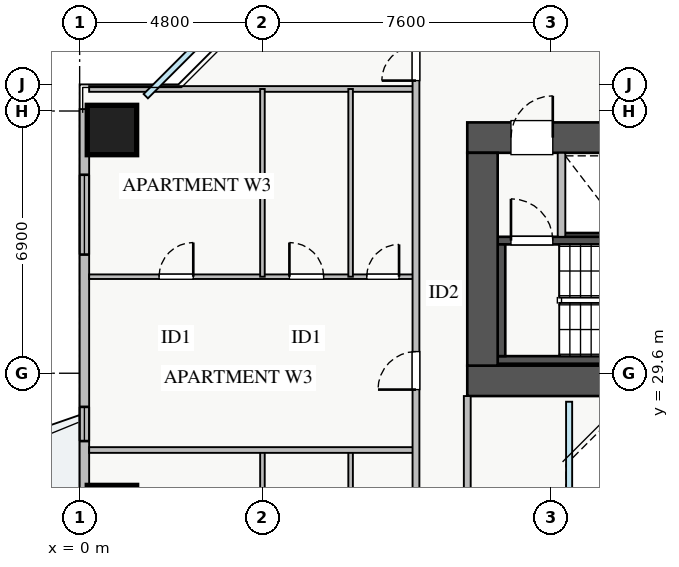
"""IFC4 building model, lengths in metres.
Left out: names, types, materials, properties, quantities, classifications, styles, units other than length and angle.
Written with IfcOpenShell. Run it as: python <this file> out.ifc"""

import sys

from ifc_helpers import new_model, si_unit, direction, frame, frame_2d, origin, origin_2d, place, context, subcontext, project, spatial, rectangle, extrude, source, transform, mapped, element, fill, save


model = new_model("IFC4")
c1 = context("Model", 3, precision=1e-05, world=origin(), true_north=direction((0.0, 1.0)))
c2 = subcontext(c1, "Body", "Model", "MODEL_VIEW")
j1 = project(units=[si_unit("LENGTHUNIT", "METRE"), si_unit("PLANEANGLEUNIT", "RADIAN")], contexts=[c1])
p1 = place(None, origin())
s1 = spatial("IfcSite", under=j1, at=p1, CompositionType="ELEMENT")
p2 = place(p1, origin())
s2 = spatial("IfcBuilding", under=s1, at=p2, CompositionType="ELEMENT")
p3 = place(p2, frame((0.0, 0.0, 79.5)))
s3 = spatial("IfcBuildingStorey", under=s2, at=p3, CompositionType="ELEMENT", Elevation=79.5)
p4 = place(p3, frame((12.68, 33.2, 0.0), z_axis=(0.0, 0.0, 1.0), x_axis=(1.0, 0.0, 0.0)))
e1 = element("IfcWall", 1, at=p4, inside=s3, PredefinedType="SHEAR", context=c2, shape_type="SweptSolid", body=[
    extrude(rectangle(XDim=1.94, YDim=0.18, at=frame_2d((0.97, 0.0))), origin(), (0.0, 0.0, 1.0), 3.07),
])
p5 = place(p3, frame((11.0, 29.95, 0.0), z_axis=(0.0, 0.0, 1.0), x_axis=(1.0, 0.0, 0.0)))
e2 = element("IfcWall", 2, at=p5, inside=s3, PredefinedType="SHEAR", context=c2, shape_type="SweptSolid", body=[
    extrude(rectangle(XDim=7.15, YDim=0.2, at=frame_2d((3.575, 0.0))), origin(), (0.0, 0.0, 1.0), 3.25),
])
p6 = place(p3, frame((11.0, 33.09, 0.0), z_axis=(0.0, 0.0, 1.0), x_axis=(1.0, 0.0, 0.0)))
e3 = element("IfcWall", 3, at=p6, inside=s3, PredefinedType="SHEAR", context=c2, shape_type="SweptSolid", body=[
    extrude(rectangle(XDim=7.15, YDim=0.2, at=frame_2d((3.575, 0.0))), origin(), (0.0, 0.0, 1.0), 3.25),
])
p7 = place(p6, frame((0.35, 0.0, 0.0)))
e4 = element("IfcOpeningElement", 4, at=p7, cuts=e3, PredefinedType="OPENING", context=c2, shape_type="SweptSolid", body=[
    extrude(rectangle(XDim=1.1, YDim=2.05, at=frame_2d((0.55, 1.025))), frame((0.0, 0.11, 0.0), z_axis=(0.0, -1.0, 0.0), x_axis=(1.0, 0.0, 0.0)), (0.0, 0.0, 1.0), 0.22),
])
p8 = place(p3, frame((11.1, 30.05, 0.0), z_axis=(0.0, 0.0, 1.0), x_axis=(0.0, 1.0, 0.0)))
e5 = element("IfcWall", 5, at=p8, inside=s3, PredefinedType="SHEAR", context=c2, shape_type="SweptSolid", body=[
    extrude(rectangle(XDim=2.94, YDim=0.2, at=frame_2d((1.47, 0.0))), origin(), (0.0, 0.0, 1.0), 3.25),
])
p9 = place(p3, frame((10.2, 29.4, 0.0), z_axis=(0.0, 0.0, 1.0), x_axis=(1.0, 0.0, 0.0)))
e6 = element("IfcWall", 6, at=p9, inside=s3, PredefinedType="SHEAR", context=c2, shape_type="SweptSolid", body=[
    extrude(rectangle(XDim=17.6, YDim=0.8, at=frame_2d((8.8, 0.0))), origin(), (0.0, 0.0, 1.0), 3.25),
])
p10 = place(p3, frame((10.2, 35.8, 0.0), z_axis=(0.0, 0.0, 1.0), x_axis=(1.0, 0.0, 0.0)))
e7 = element("IfcWall", 7, at=p10, inside=s3, PredefinedType="SHEAR", context=c2, shape_type="SweptSolid", body=[
    extrude(rectangle(XDim=17.6, YDim=0.8, at=frame_2d((8.8, 0.0))), origin(), (0.0, 0.0, 1.0), 3.25),
])
p11 = place(p10, frame((1.15, 0.0, 0.0)))
e8 = element("IfcOpeningElement", 8, at=p11, cuts=e7, PredefinedType="OPENING", context=c2, shape_type="SweptSolid", body=[
    extrude(rectangle(XDim=1.1, YDim=2.05, at=frame_2d((0.55, 1.025))), frame((0.0, 0.41, 0.0), z_axis=(0.0, -1.0, 0.0), x_axis=(1.0, 0.0, 0.0)), (0.0, 0.0, 1.0), 0.82),
])
p12 = place(p10, frame((8.3, 0.0, 0.0)))
e9 = element("IfcOpeningElement", 9, at=p12, cuts=e7, PredefinedType="OPENING", context=c2, shape_type="SweptSolid", body=[
    extrude(rectangle(XDim=1.1, YDim=2.05, at=frame_2d((0.55, 1.025))), frame((0.0, 0.41, 0.0), z_axis=(0.0, -1.0, 0.0), x_axis=(1.0, 0.0, 0.0)), (0.0, 0.0, 1.0), 0.82),
])
p13 = place(p10, frame((10.05, 0.0, 0.0)))
e10 = element("IfcOpeningElement", 10, at=p13, cuts=e7, PredefinedType="OPENING", context=c2, shape_type="SweptSolid", body=[
    extrude(rectangle(XDim=1.1, YDim=2.05, at=frame_2d((0.55, 1.025))), frame((0.0, 0.41, 0.0), z_axis=(0.0, -1.0, 0.0), x_axis=(1.0, 0.0, 0.0)), (0.0, 0.0, 1.0), 0.82),
])
p14 = place(p10, frame((14.74, 0.0, 0.0)))
e11 = element("IfcOpeningElement", 11, at=p14, cuts=e7, PredefinedType="OPENING", context=c2, shape_type="SweptSolid", body=[
    extrude(rectangle(XDim=1.0, YDim=2.05, at=frame_2d((0.5, 1.025))), frame((0.0, 0.41, 0.0), z_axis=(0.0, -1.0, 0.0), x_axis=(1.0, 0.0, 0.0)), (0.0, 0.0, 1.0), 0.82),
])
p15 = place(p10, frame((11.835, 0.0, 0.0)))
e12 = element("IfcOpeningElement", 12, at=p15, cuts=e7, PredefinedType="OPENING", context=c2, shape_type="SweptSolid", body=[
    extrude(rectangle(XDim=1.0, YDim=2.05, at=frame_2d((0.5, 1.025))), frame((0.0, 0.41, 0.0), z_axis=(0.0, -1.0, 0.0), x_axis=(1.0, 0.0, 0.0)), (0.0, 0.0, 1.0), 0.82),
])
p16 = place(p10, frame((13.37, 0.0, 0.0)))
e13 = element("IfcOpeningElement", 13, at=p16, cuts=e7, PredefinedType="OPENING", context=c2, shape_type="SweptSolid", body=[
    extrude(rectangle(XDim=1.0, YDim=2.05, at=frame_2d((0.5, 1.025))), frame((0.0, 0.41, 0.0), z_axis=(0.0, -1.0, 0.0), x_axis=(1.0, 0.0, 0.0)), (0.0, 0.0, 1.0), 0.82),
])
p17 = place(p3, frame((10.6, 29.8, 0.0), z_axis=(0.0, 0.0, 1.0), x_axis=(0.0, 1.0, 0.0)))
e14 = element("IfcWall", 14, at=p17, inside=s3, PredefinedType="SHEAR", context=c2, shape_type="SweptSolid", body=[
    extrude(rectangle(XDim=5.6, YDim=0.8, at=frame_2d((2.8, 0.0))), origin(), (0.0, 0.0, 1.0), 3.25),
])
m1 = source(origin(), c2, "Body", "SweptSolid", [
    extrude(rectangle(XDim=1.3, YDim=1.3, at=origin_2d()), origin(), (0.0, 0.0, 1.0), 3.25),
])
for number, where, z_axis, x_axis in (
    (15, (0.85, 36.0, 0.0), (0.0, 0.0, 1.0), (1.0, 0.0, 0.0)),
    (16, (0.85, 26.0, 0.0), (0.0, 0.0, 1.0), (1.0, 0.0, 0.0)),
):
    element("IfcColumn", number, at=place(p3, frame(where, z_axis=z_axis, x_axis=x_axis)), inside=s3, PredefinedType="COLUMN", context=c2, shape_type="MappedRepresentation", body=[
        mapped(m1, transform((0.0, 0.0, 0.0), x_axis=(1.0, 0.0, 0.0), y_axis=(0.0, 1.0, 0.0), z_axis=(0.0, 0.0, 1.0), scale=1.0)),
    ])
p18 = place(p3, frame((0.125, 9.45, 0.0), z_axis=(0.0, 0.0, 1.0), x_axis=(0.0, 1.0, 0.0)))
e17 = element("IfcWall", 17, at=p18, inside=s3, PredefinedType="STANDARD", context=c2, shape_type="SweptSolid", body=[
    extrude(rectangle(XDim=27.1, YDim=0.25, at=frame_2d((13.55, 0.0))), origin(), (0.0, 0.0, 1.0), 2.61),
])
p19 = place(p18, frame((14.4, 0.0, 0.0)))
e18 = element("IfcOpeningElement", 18, at=p19, cuts=e17, PredefinedType="OPENING", context=c2, shape_type="SweptSolid", body=[
    extrude(rectangle(XDim=1.2, YDim=2.1, at=frame_2d((0.6, 1.05))), frame((0.0, 0.135, 0.0), z_axis=(0.0, -1.0, 0.0), x_axis=(1.0, 0.0, 0.0)), (0.0, 0.0, 1.0), 0.27),
])
p20 = place(p18, frame((2.188, 0.0, 0.9)))
e19 = element("IfcOpeningElement", 19, at=p20, cuts=e17, PredefinedType="OPENING", context=c2, shape_type="SweptSolid", body=[
    extrude(rectangle(XDim=2.4, YDim=1.48, at=frame_2d((1.2, 0.74))), frame((0.0, 0.135, 0.0), z_axis=(0.0, -1.0, 0.0), x_axis=(1.0, 0.0, 0.0)), (0.0, 0.0, 1.0), 0.27),
])
p21 = place(p18, frame((23.272, 0.0, 0.9)))
e20 = element("IfcOpeningElement", 20, at=p21, cuts=e17, PredefinedType="OPENING", context=c2, shape_type="SweptSolid", body=[
    extrude(rectangle(XDim=2.1, YDim=1.5, at=frame_2d((1.05, 0.75))), frame((0.0, 0.135, 0.0), z_axis=(0.0, -1.0, 0.0), x_axis=(1.0, 0.0, 0.0)), (0.0, 0.0, 1.0), 0.27),
])
p22 = place(p18, frame((11.365, 0.0, 0.9)))
e21 = element("IfcOpeningElement", 21, at=p22, cuts=e17, PredefinedType="OPENING", context=c2, shape_type="SweptSolid", body=[
    extrude(rectangle(XDim=0.9, YDim=1.2, at=frame_2d((0.45, 0.6))), frame((0.0, 0.135, 0.0), z_axis=(0.0, -1.0, 0.0), x_axis=(1.0, 0.0, 0.0)), (0.0, 0.0, 1.0), 0.27),
])
p23 = place(p18, frame((18.365, 0.0, 0.9)))
e22 = element("IfcOpeningElement", 22, at=p23, cuts=e17, PredefinedType="OPENING", context=c2, shape_type="SweptSolid", body=[
    extrude(rectangle(XDim=0.9, YDim=1.2, at=frame_2d((0.45, 0.6))), frame((0.0, 0.135, 0.0), z_axis=(0.0, -1.0, 0.0), x_axis=(1.0, 0.0, 0.0)), (0.0, 0.0, 1.0), 0.27),
])
p24 = place(p3, frame((12.68, 33.19, 0.0), z_axis=(0.0, 0.0, 1.0), x_axis=(0.0, 1.0, 0.0)))
e23 = element("IfcWall", 23, at=p24, inside=s3, PredefinedType="PARTITIONING", context=c2, shape_type="SweptSolid", body=[
    extrude(rectangle(XDim=2.21, YDim=0.2, at=frame_2d((1.105, 0.0))), origin(), (0.0, 0.0, 1.0), 3.07),
])
p25 = place(p3, frame((0.25, 37.08, 0.0), z_axis=(0.0, 0.0, 1.0), x_axis=(1.0, 0.0, 0.0)))
e24 = element("IfcWall", 24, at=p25, inside=s3, PredefinedType="PARTITIONING", context=c2, shape_type="SweptSolid", body=[
    extrude(rectangle(XDim=8.6, YDim=0.15, at=frame_2d((4.3, 0.0))), origin(), (0.0, 0.0, 1.0), 3.07),
])
for number, where, z_axis, x_axis in (
    (25, (4.81, 22.93, 0.0), (0.0, 0.0, 1.0), (0.0, 1.0, 0.0)),
    (26, (7.13, 22.93, 0.0), (0.0, 0.0, 1.0), (0.0, 1.0, 0.0)),
):
    element("IfcWall", number, at=place(p3, frame(where, z_axis=z_axis, x_axis=x_axis)), inside=s3, PredefinedType="PLUMBINGWALL", context=c2, shape_type="SweptSolid", body=[
        extrude(rectangle(XDim=4.65, YDim=0.12, at=frame_2d((2.325, 0.0))), origin(), (0.0, 0.0, 1.0), 3.07),
    ])
p26 = place(p3, frame((0.25, 32.14, 0.0), z_axis=(0.0, 0.0, 1.0), x_axis=(1.0, 0.0, 0.0)))
e27 = element("IfcWall", 27, at=p26, inside=s3, PredefinedType="PLUMBINGWALL", context=c2, shape_type="SweptSolid", body=[
    extrude(rectangle(XDim=8.6, YDim=0.12, at=frame_2d((4.3, 0.0))), origin(), (0.0, 0.0, 1.0), 3.07),
])
p27 = place(p26, frame((1.84, 0.0, 0.0)))
e28 = element("IfcOpeningElement", 28, at=p27, cuts=e27, PredefinedType="OPENING", context=c2, shape_type="SweptSolid", body=[
    extrude(rectangle(XDim=0.9, YDim=2.05, at=frame_2d((0.45, 1.025))), frame((0.0, 0.07, 0.0), z_axis=(0.0, -1.0, 0.0), x_axis=(1.0, 0.0, 0.0)), (0.0, 0.0, 1.0), 0.14),
])
p28 = place(p26, frame((5.27, 0.0, 0.0)))
e29 = element("IfcOpeningElement", 29, at=p28, cuts=e27, PredefinedType="OPENING", context=c2, shape_type="SweptSolid", body=[
    extrude(rectangle(XDim=0.9, YDim=2.05, at=frame_2d((0.45, 1.025))), frame((0.0, 0.07, 0.0), z_axis=(0.0, -1.0, 0.0), x_axis=(1.0, 0.0, 0.0)), (0.0, 0.0, 1.0), 0.14),
])
p29 = place(p26, frame((7.305, 0.0, 0.0)))
e30 = element("IfcOpeningElement", 30, at=p29, cuts=e27, PredefinedType="OPENING", context=c2, shape_type="SweptSolid", body=[
    extrude(rectangle(XDim=0.85, YDim=2.05, at=frame_2d((0.425, 1.025))), frame((0.0, 0.07, 0.0), z_axis=(0.0, -1.0, 0.0), x_axis=(1.0, 0.0, 0.0)), (0.0, 0.0, 1.0), 0.14),
])
for number, where, z_axis, x_axis in (
    (31, (4.81, 32.14, 0.0), (0.0, 0.0, 1.0), (0.0, 1.0, 0.0)),
    (32, (7.13, 32.14, 0.0), (0.0, 0.0, 1.0), (0.0, 1.0, 0.0)),
):
    element("IfcWall", number, at=place(p3, frame(where, z_axis=z_axis, x_axis=x_axis)), inside=s3, PredefinedType="PLUMBINGWALL", context=c2, shape_type="SweptSolid", body=[
        extrude(rectangle(XDim=4.94, YDim=0.12, at=frame_2d((2.47, 0.0))), origin(), (0.0, 0.0, 1.0), 3.07),
    ])
p30 = place(p3, frame((0.25, 27.58, 0.0), z_axis=(0.0, 0.0, 1.0), x_axis=(1.0, 0.0, 0.0)))
e33 = element("IfcWall", 33, at=p30, inside=s3, PredefinedType="PARTITIONING", context=c2, shape_type="SweptSolid", body=[
    extrude(rectangle(XDim=8.6, YDim=0.15, at=frame_2d((4.3, 0.0))), origin(), (0.0, 0.0, 1.0), 3.07),
])
p31 = place(p3, frame((8.85, 7.21, 0.0), z_axis=(0.0, 0.0, 1.0), x_axis=(0.0, 1.0, 0.0)))
e34 = element("IfcWall", 34, at=p31, inside=s3, PredefinedType="PARTITIONING", context=c2, shape_type="SweptSolid", body=[
    extrude(rectangle(XDim=31.23, YDim=0.18, at=frame_2d((15.615, 0.0))), origin(), (0.0, 0.0, 1.0), 3.07),
])
p32 = place(p31, frame((30.09, 0.0, 0.0)))
e35 = element("IfcOpeningElement", 35, at=p32, cuts=e34, PredefinedType="OPENING", context=c2, shape_type="SweptSolid", body=[
    extrude(rectangle(XDim=0.9, YDim=2.05, at=frame_2d((0.45, 1.025))), frame((0.0, 0.1, 0.0), z_axis=(0.0, -1.0, 0.0), x_axis=(1.0, 0.0, 0.0)), (0.0, 0.0, 1.0), 0.2),
])
p33 = place(p31, frame((0.24, 0.0, 0.0)))
e36 = element("IfcOpeningElement", 36, at=p33, cuts=e34, PredefinedType="OPENING", context=c2, shape_type="SweptSolid", body=[
    extrude(rectangle(XDim=0.9, YDim=2.05, at=frame_2d((0.45, 1.025))), frame((0.0, 0.1, 0.0), z_axis=(0.0, -1.0, 0.0), x_axis=(1.0, 0.0, 0.0)), (0.0, 0.0, 1.0), 0.2),
])
p34 = place(p31, frame((5.895, 0.0, 0.0)))
e37 = element("IfcOpeningElement", 37, at=p34, cuts=e34, PredefinedType="OPENING", context=c2, shape_type="SweptSolid", body=[
    extrude(rectangle(XDim=1.0, YDim=2.05, at=frame_2d((0.5, 1.025))), frame((0.0, 0.1, 0.0), z_axis=(0.0, -1.0, 0.0), x_axis=(1.0, 0.0, 0.0)), (0.0, 0.0, 1.0), 0.2),
])
p35 = place(p31, frame((12.885, 0.0, 0.0)))
e38 = element("IfcOpeningElement", 38, at=p35, cuts=e34, PredefinedType="OPENING", context=c2, shape_type="SweptSolid", body=[
    extrude(rectangle(XDim=1.0, YDim=2.05, at=frame_2d((0.5, 1.025))), frame((0.0, 0.1, 0.0), z_axis=(0.0, -1.0, 0.0), x_axis=(1.0, 0.0, 0.0)), (0.0, 0.0, 1.0), 0.2),
])
p36 = place(p31, frame((21.96, 0.0, 0.0)))
e39 = element("IfcOpeningElement", 39, at=p36, cuts=e34, PredefinedType="OPENING", context=c2, shape_type="SweptSolid", body=[
    extrude(rectangle(XDim=1.0, YDim=2.05, at=frame_2d((0.5, 1.025))), frame((0.0, 0.1, 0.0), z_axis=(0.0, -1.0, 0.0), x_axis=(1.0, 0.0, 0.0)), (0.0, 0.0, 1.0), 0.2),
])
p37 = place(p3, frame((10.2, 17.0, 0.0), z_axis=(0.0, 0.0, 1.0), x_axis=(0.0, 1.0, 0.0)))
e40 = element("IfcWall", 40, at=p37, inside=s3, PredefinedType="PARTITIONING", context=c2, shape_type="SweptSolid", body=[
    extrude(rectangle(XDim=12.0, YDim=0.18, at=frame_2d((6.0, 0.0))), origin(), (0.0, 0.0, 1.0), 3.07),
])
p38 = place(p37, frame((1.5, 0.0, 0.0)))
e41 = element("IfcOpeningElement", 41, at=p38, cuts=e40, PredefinedType="OPENING", context=c2, shape_type="SweptSolid", body=[
    extrude(rectangle(XDim=0.85, YDim=2.05, at=frame_2d((0.425, 1.025))), frame((0.0, 0.1, 0.0), z_axis=(0.0, -1.0, 0.0), x_axis=(1.0, 0.0, 0.0)), (0.0, 0.0, 1.0), 0.2),
])
p39 = place(p37, frame((6.5, 0.0, 0.0)))
e42 = element("IfcOpeningElement", 42, at=p39, cuts=e40, PredefinedType="OPENING", context=c2, shape_type="SweptSolid", body=[
    extrude(rectangle(XDim=1.0, YDim=2.05, at=frame_2d((0.5, 1.025))), frame((0.0, 0.1, 0.0), z_axis=(0.0, -1.0, 0.0), x_axis=(1.0, 0.0, 0.0)), (0.0, 0.0, 1.0), 0.2),
])
m2 = source(origin(), c2, "Body", "SweptSolid", [
    extrude(rectangle(XDim=2.1, YDim=1.5, at=frame_2d((1.05, 0.75))), frame((0.0, 0.03, 0.0), z_axis=(0.0, -1.0, 0.0), x_axis=(1.0, 0.0, 0.0)), (0.0, 0.0, 1.0), 0.06),
])
p40 = place(p21, origin())
e43 = element("IfcWindow", 43, at=p40, inside=s3, PartitioningType="TRIPLE_PANEL_VERTICAL", PredefinedType="WINDOW", context=c2, shape_type="MappedRepresentation", body=[
    mapped(m2, transform((0.0, 0.0, 0.0), x_axis=(1.0, 0.0, 0.0), y_axis=(0.0, 1.0, 0.0), z_axis=(0.0, 0.0, 1.0), scale=1.0)),
])
fill(e20, e43)
m3 = source(origin(), c2, "Body", "SweptSolid", [
    extrude(rectangle(XDim=1.1, YDim=2.05, at=frame_2d((0.55, 1.025))), frame((0.0, 0.025, 0.0), z_axis=(0.0, -1.0, 0.0), x_axis=(1.0, 0.0, 0.0)), (0.0, 0.0, 1.0), 0.05),
])
p41 = place(p11, origin())
e44 = element("IfcDoor", 44, at=p41, inside=s3, OperationType="SINGLE_SWING_RIGHT", PredefinedType="DOOR", context=c2, shape_type="MappedRepresentation", body=[
    mapped(m3, transform((0.0, 0.0, 0.0), x_axis=(1.0, 0.0, 0.0), y_axis=(0.0, 1.0, 0.0), z_axis=(0.0, 0.0, 1.0), scale=1.0)),
])
fill(e8, e44)
p42 = place(p7, origin())
e45 = element("IfcDoor", 45, at=p42, inside=s3, OperationType="SINGLE_SWING_LEFT", PredefinedType="DOOR", context=c2, shape_type="MappedRepresentation", body=[
    mapped(m3, transform((0.0, 0.0, 0.0), x_axis=(1.0, 0.0, 0.0), y_axis=(0.0, 1.0, 0.0), z_axis=(0.0, 0.0, 1.0), scale=1.0)),
])
fill(e4, e45)
m4 = source(origin(), c2, "Body", "SweptSolid", [
    extrude(rectangle(XDim=0.9, YDim=2.05, at=frame_2d((0.45, 1.025))), frame((0.0, 0.025, 0.0), z_axis=(0.0, -1.0, 0.0), x_axis=(1.0, 0.0, 0.0)), (0.0, 0.0, 1.0), 0.05),
])
p43 = place(p27, origin())
e46 = element("IfcDoor", 46, at=p43, inside=s3, OperationType="SINGLE_SWING_RIGHT", PredefinedType="DOOR", context=c2, shape_type="MappedRepresentation", body=[
    mapped(m4, transform((0.0, 0.0, 0.0), x_axis=(1.0, 0.0, 0.0), y_axis=(0.0, 1.0, 0.0), z_axis=(0.0, 0.0, 1.0), scale=1.0)),
])
fill(e28, e46)
p44 = place(p28, origin())
e47 = element("IfcDoor", 47, at=p44, inside=s3, OperationType="SINGLE_SWING_LEFT", PredefinedType="DOOR", context=c2, shape_type="MappedRepresentation", body=[
    mapped(m4, transform((0.0, 0.0, 0.0), x_axis=(1.0, 0.0, 0.0), y_axis=(0.0, 1.0, 0.0), z_axis=(0.0, 0.0, 1.0), scale=1.0)),
])
fill(e29, e47)
m5 = source(origin(), c2, "Body", "SweptSolid", [
    extrude(rectangle(XDim=0.85, YDim=2.05, at=frame_2d((0.425, 1.025))), frame((0.0, 0.025, 0.0), z_axis=(0.0, -1.0, 0.0), x_axis=(1.0, 0.0, 0.0)), (0.0, 0.0, 1.0), 0.05),
])
p45 = place(p29, origin())
e48 = element("IfcDoor", 48, at=p45, inside=s3, OperationType="SINGLE_SWING_RIGHT", PredefinedType="DOOR", context=c2, shape_type="MappedRepresentation", body=[
    mapped(m5, transform((0.0, 0.0, 0.0), x_axis=(1.0, 0.0, 0.0), y_axis=(0.0, 1.0, 0.0), z_axis=(0.0, 0.0, 1.0), scale=1.0)),
])
fill(e30, e48)
p46 = place(p32, origin())
e49 = element("IfcDoor", 49, at=p46, inside=s3, OperationType="SINGLE_SWING_LEFT", PredefinedType="DOOR", context=c2, shape_type="MappedRepresentation", body=[
    mapped(m4, transform((0.0, 0.0, 0.0), x_axis=(1.0, 0.0, 0.0), y_axis=(0.0, 1.0, 0.0), z_axis=(0.0, 0.0, 1.0), scale=1.0)),
])
fill(e35, e49)
m6 = source(origin(), c2, "Body", "SweptSolid", [
    extrude(rectangle(XDim=1.0, YDim=2.05, at=frame_2d((0.5, 1.025))), frame((0.0, 0.025, 0.0), z_axis=(0.0, -1.0, 0.0), x_axis=(1.0, 0.0, 0.0)), (0.0, 0.0, 1.0), 0.05),
])
p47 = place(p36, origin())
e50 = element("IfcDoor", 50, at=p47, inside=s3, OperationType="SINGLE_SWING_LEFT", PredefinedType="DOOR", context=c2, shape_type="MappedRepresentation", body=[
    mapped(m6, transform((0.0, 0.0, 0.0), x_axis=(1.0, 0.0, 0.0), y_axis=(0.0, 1.0, 0.0), z_axis=(0.0, 0.0, 1.0), scale=1.0)),
])
fill(e39, e50)
m7 = source(origin(), c2, "Body", "SweptSolid", [
    extrude(rectangle(XDim=0.9, YDim=1.2, at=frame_2d((0.45, 0.6))), frame((0.0, 0.03, 0.0), z_axis=(0.0, -1.0, 0.0), x_axis=(1.0, 0.0, 0.0)), (0.0, 0.0, 1.0), 0.06),
])
p48 = place(p23, origin())
e51 = element("IfcWindow", 51, at=p48, inside=s3, PartitioningType="SINGLE_PANEL", PredefinedType="WINDOW", context=c2, shape_type="MappedRepresentation", body=[
    mapped(m7, transform((0.0, 0.0, 0.0), x_axis=(1.0, 0.0, 0.0), y_axis=(0.0, 1.0, 0.0), z_axis=(0.0, 0.0, 1.0), scale=1.0)),
])
fill(e22, e51)
save(model, sys.argv[1])
